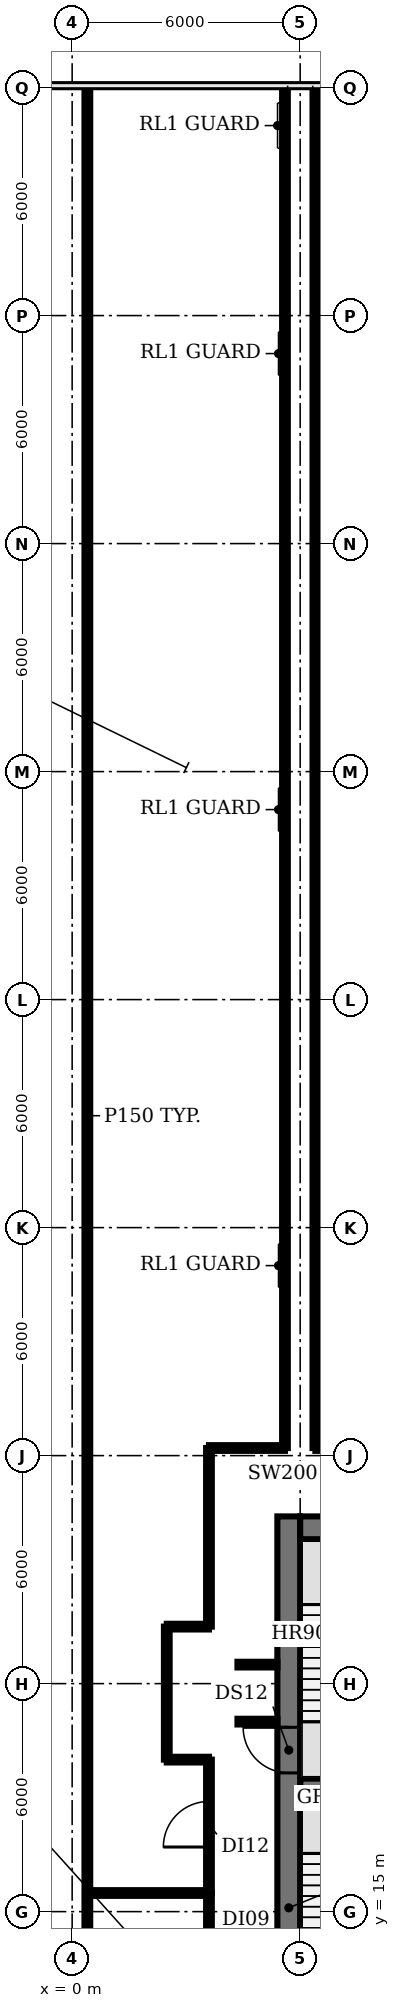
"""IFC4 building model, lengths in metres.
Left out: names, types, materials, properties, quantities, classifications, styles, units other than length and angle.
Written with IfcOpenShell. Run it as: python <this file> out.ifc"""

import sys

from ifc_helpers import new_model, si_unit, direction, frame, frame_2d, origin, place, context, subcontext, project, spatial, rectangle, extrude, element, fill, save


model = new_model("IFC4")
c1 = context("Model", 3, precision=1e-05, world=origin(), true_north=direction((0.0, 1.0)))
c2 = subcontext(c1, "Body", "Model", "MODEL_VIEW")
j1 = project(units=[si_unit("LENGTHUNIT", "METRE"), si_unit("PLANEANGLEUNIT", "RADIAN")], contexts=[c1])
p1 = place(None, origin())
s1 = spatial("IfcSite", under=j1, at=p1, CompositionType="ELEMENT")
p2 = place(p1, origin())
s2 = spatial("IfcBuilding", under=s1, at=p2, CompositionType="ELEMENT")
p3 = place(p2, frame((0.0, 0.0, 197.0)))
s3 = spatial("IfcBuildingStorey", under=s2, at=p3, CompositionType="ELEMENT", Elevation=197.0)
p4 = place(p3, frame((6.0, 18.375, 0.0), z_axis=(0.0, 0.0, 1.0), x_axis=(1.0, 0.0, 0.0)))
e1 = element("IfcWall", 1, at=p4, inside=s3, PredefinedType="SHEAR", context=c2, shape_type="SweptSolid", body=[
    extrude(rectangle(XDim=3.15, YDim=0.25, at=frame_2d((1.575, 0.0))), origin(), (0.0, 0.0, 1.0), 8.05),
])
p5 = place(p3, frame((5.7, 4.8, 0.0), z_axis=(0.0, 0.0, 1.0), x_axis=(0.0, 1.0, 0.0)))
e2 = element("IfcWall", 2, at=p5, inside=s3, PredefinedType="SHEAR", context=c2, shape_type="SweptSolid", body=[
    extrude(rectangle(XDim=20.6, YDim=0.6, at=frame_2d((10.3, 0.0))), origin(), (0.0, 0.0, 1.0), 8.05),
])
p6 = place(p5, frame((0.85, 0.0, 0.0)))
e3 = element("IfcOpeningElement", 3, at=p6, cuts=e2, PredefinedType="OPENING", context=c2, shape_type="SweptSolid", body=[
    extrude(rectangle(XDim=1.5, YDim=2.1, at=frame_2d((0.75, 1.05))), frame((0.0, 0.31, 0.0), z_axis=(0.0, -1.0, 0.0), x_axis=(1.0, 0.0, 0.0)), (0.0, 0.0, 1.0), 0.62),
])
p7 = place(p5, frame((7.3, 0.0, 0.0)))
e4 = element("IfcOpeningElement", 4, at=p7, cuts=e2, PredefinedType="OPENING", context=c2, shape_type="SweptSolid", body=[
    extrude(rectangle(XDim=1.2, YDim=2.1, at=frame_2d((0.6, 1.05))), frame((0.0, 0.31, 0.0), z_axis=(0.0, -1.0, 0.0), x_axis=(1.0, 0.0, 0.0)), (0.0, 0.0, 1.0), 0.62),
])
p8 = place(p5, frame((13.85, 0.0, 0.0)))
e5 = element("IfcOpeningElement", 5, at=p8, cuts=e2, PredefinedType="OPENING", context=c2, shape_type="SweptSolid", body=[
    extrude(rectangle(XDim=1.2, YDim=2.1, at=frame_2d((0.6, 1.05))), frame((0.0, 0.31, 0.0), z_axis=(0.0, -1.0, 0.0), x_axis=(1.0, 0.0, 0.0)), (0.0, 0.0, 1.0), 0.62),
])
p9 = place(p3, frame((6.0, 25.1, 0.0), z_axis=(0.0, 0.0, 1.0), x_axis=(1.0, 0.0, 0.0)))
e6 = element("IfcWall", 6, at=p9, inside=s3, PredefinedType="SHEAR", context=c2, shape_type="SweptSolid", body=[
    extrude(rectangle(XDim=18.0, YDim=0.6, at=frame_2d((9.0, 0.0))), origin(), (0.0, 0.0, 1.0), 8.05),
])
p10 = place(p3, frame((0.4, 8.89, 0.0), z_axis=(0.0, 0.0, 1.0), x_axis=(0.0, 1.0, 0.0)))
e7 = element("IfcWall", 7, at=p10, inside=s3, PredefinedType="PARTITIONING", context=c2, shape_type="SweptSolid", body=[
    extrude(rectangle(XDim=54.11, YDim=0.15, at=frame_2d((27.055, 0.0))), origin(), (0.0, 0.0, 1.0), 6.33),
])
p11 = place(p3, frame((0.4, 15.49, 0.0), z_axis=(0.0, 0.0, 1.0), x_axis=(1.0, 0.0, 0.0)))
e8 = element("IfcWall", 8, at=p11, inside=s3, PredefinedType="PARTITIONING", context=c2, shape_type="SweptSolid", body=[
    extrude(rectangle(XDim=3.2, YDim=0.15, at=frame_2d((1.6, 0.0))), origin(), (0.0, 0.0, 1.0), 6.33),
])
p12 = place(p3, frame((2.49, 19.0, 0.0), z_axis=(0.0, 0.0, 1.0), x_axis=(0.0, 1.0, 0.0)))
e9 = element("IfcWall", 9, at=p12, inside=s3, PredefinedType="PARTITIONING", context=c2, shape_type="SweptSolid", body=[
    extrude(rectangle(XDim=3.5, YDim=0.15, at=frame_2d((1.75, 0.0))), origin(), (0.0, 0.0, 1.0), 6.33),
])
for number, where, z_axis, x_axis in (
    (10, (2.49, 19.0, 0.0), (0.0, 0.0, 1.0), (1.0, 0.0, 0.0)),
    (11, (2.49, 22.5, 0.0), (0.0, 0.0, 1.0), (1.0, 0.0, 0.0)),
):
    element("IfcWall", number, at=place(p3, frame(where, z_axis=z_axis, x_axis=x_axis)), inside=s3, PredefinedType="PARTITIONING", context=c2, shape_type="SweptSolid", body=[
        extrude(rectangle(XDim=1.11, YDim=0.15, at=frame_2d((0.555, 0.0))), origin(), (0.0, 0.0, 1.0), 6.33),
    ])
p13 = place(p3, frame((3.6, 12.19, 0.0), z_axis=(0.0, 0.0, 1.0), x_axis=(0.0, 1.0, 0.0)))
e12 = element("IfcWall", 12, at=p13, inside=s3, PredefinedType="PARTITIONING", context=c2, shape_type="SweptSolid", body=[
    extrude(rectangle(XDim=3.3, YDim=0.15, at=frame_2d((1.65, 0.0))), origin(), (0.0, 0.0, 1.0), 6.33),
])
p14 = place(p13, frame((1.3, 0.0, 0.0)))
e13 = element("IfcOpeningElement", 13, at=p14, cuts=e12, PredefinedType="OPENING", context=c2, shape_type="SweptSolid", body=[
    extrude(rectangle(XDim=0.9, YDim=2.1, at=frame_2d((0.45, 1.05))), frame((0.0, 0.085, 0.0), z_axis=(0.0, -1.0, 0.0), x_axis=(1.0, 0.0, 0.0)), (0.0, 0.0, 1.0), 0.17),
])
p15 = place(p3, frame((3.6, 15.49, 0.0), z_axis=(0.0, 0.0, 1.0), x_axis=(0.0, 1.0, 0.0)))
e14 = element("IfcWall", 14, at=p15, inside=s3, PredefinedType="PARTITIONING", context=c2, shape_type="SweptSolid", body=[
    extrude(rectangle(XDim=3.51, YDim=0.15, at=frame_2d((1.755, 0.0))), origin(), (0.0, 0.0, 1.0), 6.33),
])
p16 = place(p15, frame((1.21, 0.0, 0.0)))
e15 = element("IfcOpeningElement", 15, at=p16, cuts=e14, PredefinedType="OPENING", context=c2, shape_type="SweptSolid", body=[
    extrude(rectangle(XDim=1.2, YDim=2.1, at=frame_2d((0.6, 1.05))), frame((0.0, 0.085, 0.0), z_axis=(0.0, -1.0, 0.0), x_axis=(1.0, 0.0, 0.0)), (0.0, 0.0, 1.0), 0.17),
])
p17 = place(p3, frame((3.6, 22.5, 0.0), z_axis=(0.0, 0.0, 1.0), x_axis=(0.0, 1.0, 0.0)))
e16 = element("IfcWall", 16, at=p17, inside=s3, PredefinedType="PARTITIONING", context=c2, shape_type="SweptSolid", body=[
    extrude(rectangle(XDim=4.7, YDim=0.15, at=frame_2d((2.35, 0.0))), origin(), (0.0, 0.0, 1.0), 6.33),
])
p18 = place(p3, frame((3.6, 27.2, 0.0), z_axis=(0.0, 0.0, 1.0), x_axis=(1.0, 0.0, 0.0)))
e17 = element("IfcWall", 17, at=p18, inside=s3, PredefinedType="PARTITIONING", context=c2, shape_type="SweptSolid", body=[
    extrude(rectangle(XDim=2.0, YDim=0.15, at=frame_2d((1.0, 0.0))), origin(), (0.0, 0.0, 1.0), 6.33),
])
for number, where, z_axis, x_axis in (
    (18, (4.35, 20.0, 0.0), (0.0, 0.0, 1.0), (1.0, 0.0, 0.0)),
    (19, (4.35, 21.5, 0.0), (0.0, 0.0, 1.0), (1.0, 0.0, 0.0)),
):
    element("IfcWall", number, at=place(p3, frame(where, z_axis=z_axis, x_axis=x_axis)), inside=s3, PredefinedType="PARTITIONING", context=c2, shape_type="SweptSolid", body=[
        extrude(rectangle(XDim=1.05, YDim=0.15, at=frame_2d((0.525, 0.0))), origin(), (0.0, 0.0, 1.0), 6.33),
    ])
p19 = place(p3, frame((5.6, 27.2, 0.0), z_axis=(0.0, 0.0, 1.0), x_axis=(0.0, 1.0, 0.0)))
e20 = element("IfcWall", 20, at=p19, inside=s3, PredefinedType="PARTITIONING", context=c2, shape_type="SweptSolid", body=[
    extrude(rectangle(XDim=35.765, YDim=0.15, at=frame_2d((17.883, 0.0))), origin(), (0.0, 0.0, 1.0), 6.33),
])
p20 = place(p3, frame((6.4, 27.2, 0.0), z_axis=(0.0, 0.0, 1.0), x_axis=(0.0, 1.0, 0.0)))
e21 = element("IfcWall", 21, at=p20, inside=s3, PredefinedType="PARTITIONING", context=c2, shape_type="SweptSolid", body=[
    extrude(rectangle(XDim=35.8, YDim=0.15, at=frame_2d((17.9, 0.0))), origin(), (0.0, 0.0, 1.0), 6.33),
])
p21 = place(p3, frame((6.4, 27.2, 0.0), z_axis=(0.0, 0.0, 1.0), x_axis=(1.0, 0.0, 0.0)))
e22 = element("IfcWall", 22, at=p21, inside=s3, PredefinedType="PARTITIONING", context=c2, shape_type="SweptSolid", body=[
    extrude(rectangle(XDim=5.2, YDim=0.15, at=frame_2d((2.6, 0.0))), origin(), (0.0, 0.0, 1.0), 6.33),
])
p22 = place(p21, frame((2.2, 0.0, 0.0)))
e23 = element("IfcOpeningElement", 23, at=p22, cuts=e22, PredefinedType="OPENING", context=c2, shape_type="SweptSolid", body=[
    extrude(rectangle(XDim=1.0, YDim=2.1, at=frame_2d((0.5, 1.05))), frame((0.0, 0.085, 0.0), z_axis=(0.0, -1.0, 0.0), x_axis=(1.0, 0.0, 0.0)), (0.0, 0.0, 1.0), 0.17),
])
p23 = place(p8, origin())
e24 = element("IfcDoor", 24, at=p23, inside=s3, OperationType="SINGLE_SWING_RIGHT", PredefinedType="DOOR", context=c2, shape_type="SweptSolid", body=[
    extrude(rectangle(XDim=1.2, YDim=2.1, at=frame_2d((0.6, 1.05))), frame((0.0, 0.025, 0.0), z_axis=(0.0, -1.0, 0.0), x_axis=(1.0, 0.0, 0.0)), (0.0, 0.0, 1.0), 0.05),
])
fill(e5, e24)
p24 = place(p16, origin())
e25 = element("IfcDoor", 25, at=p24, inside=s3, OperationType="SINGLE_SWING_LEFT", PredefinedType="DOOR", context=c2, shape_type="SweptSolid", body=[
    extrude(rectangle(XDim=1.2, YDim=2.1, at=frame_2d((0.6, 1.05))), frame((0.0, 0.025, 0.0), z_axis=(0.0, -1.0, 0.0), x_axis=(1.0, 0.0, 0.0)), (0.0, 0.0, 1.0), 0.05),
])
fill(e15, e25)
save(model, sys.argv[1])
